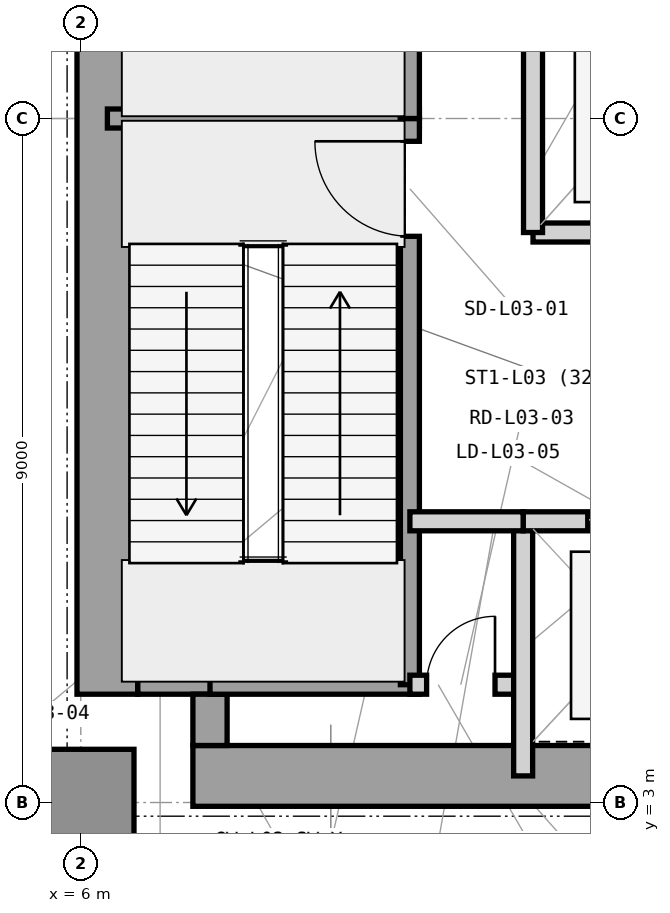
"""IFC4 building model, lengths in metres.
Left out: names, types, materials, properties, quantities, classifications, styles, units other than length and angle.
Written with IfcOpenShell. Run it as: python <this file> out.ifc"""

import sys

from ifc_helpers import new_model, si_unit, direction, frame, frame_2d, origin, origin_2d, place, context, subcontext, project, spatial, rectangle, extrude, element, fill, save


model = new_model("IFC4")
c1 = context("Model", 3, precision=1e-05, world=origin(), true_north=direction((0.0, 1.0)))
c2 = subcontext(c1, "Body", "Model", "MODEL_VIEW")
j1 = project(units=[si_unit("LENGTHUNIT", "METRE"), si_unit("PLANEANGLEUNIT", "RADIAN")], contexts=[c1])
p1 = place(None, origin())
s1 = spatial("IfcSite", under=j1, at=p1, CompositionType="ELEMENT")
p2 = place(p1, origin())
s2 = spatial("IfcBuilding", under=s1, at=p2, CompositionType="ELEMENT")
p3 = place(p2, frame((0.0, 0.0, 16.2)))
s3 = spatial("IfcBuildingStorey", under=s2, at=p3, CompositionType="ELEMENT", Elevation=16.2)
p4 = place(p3, frame((7.475, 3.35, 0.0), z_axis=(0.0, 0.0, 1.0), x_axis=(1.0, 0.0, 0.0)))
e1 = element("IfcWall", 1, at=p4, inside=s3, PredefinedType="SHEAR", context=c2, shape_type="SweptSolid", body=[
    extrude(rectangle(XDim=16.575, YDim=0.8, at=frame_2d((8.288, 0.0))), origin(), (0.0, 0.0, 1.0), 5.4),
])
p5 = place(p3, frame((6.35, 4.425, 0.0), z_axis=(0.0, 0.0, 1.0), x_axis=(0.0, 1.0, 0.0)))
e2 = element("IfcWall", 2, at=p5, inside=s3, PredefinedType="SHEAR", context=c2, shape_type="SweptSolid", body=[
    extrude(rectangle(XDim=15.15, YDim=0.8, at=frame_2d((7.575, 0.0))), origin(), (0.0, 0.0, 1.0), 5.4),
])
p6 = place(p3, frame((6.75, 4.65, 0.0), z_axis=(0.0, 0.0, 1.0), x_axis=(1.0, 0.0, 0.0)))
e3 = element("IfcWall", 3, at=p6, inside=s3, PredefinedType="SHEAR", context=c2, shape_type="SweptSolid", body=[
    extrude(rectangle(XDim=1.175, YDim=0.45, at=frame_2d((0.587, 0.0))), origin(), (0.0, 0.0, 1.0), 5.4),
])
p7 = place(p3, frame((7.7, 3.75, 0.0), z_axis=(0.0, 0.0, 1.0), x_axis=(0.0, 1.0, 0.0)))
e4 = element("IfcWall", 4, at=p7, inside=s3, PredefinedType="SHEAR", context=c2, shape_type="SweptSolid", body=[
    extrude(rectangle(XDim=0.675, YDim=0.45, at=frame_2d((0.337, 0.0))), origin(), (0.0, 0.0, 1.0), 5.4),
])
p8 = place(p3, frame((6.0, 3.0, -0.6), z_axis=(0.0, 0.0, 1.0), x_axis=(1.0, 0.0, 0.0)))
e5 = element("IfcColumn", 5, at=p8, inside=s3, PredefinedType="COLUMN", context=c2, shape_type="SweptSolid", body=[
    extrude(rectangle(XDim=1.4, YDim=1.4, at=origin_2d()), origin(), (0.0, 0.0, 1.0), 6.0),
])
p9 = place(p3, frame((6.35, 12.0, 0.0), z_axis=(0.0, 0.0, 1.0), x_axis=(1.0, 0.0, 0.0)))
e6 = element("IfcWall", 6, at=p9, inside=s3, PredefinedType="SHEAR", context=c2, shape_type="SweptSolid", body=[
    extrude(rectangle(XDim=4.105, YDim=0.25, at=frame_2d((2.052, 0.0))), origin(), (0.0, 0.0, 1.0), 5.4),
])
p10 = place(p3, frame((7.7, 4.55, 0.0), z_axis=(0.0, 0.0, 1.0), x_axis=(1.0, 0.0, 0.0)))
e7 = element("IfcWall", 7, at=p10, inside=s3, PredefinedType="SHEAR", context=c2, shape_type="SweptSolid", body=[
    extrude(rectangle(XDim=2.755, YDim=0.25, at=frame_2d((1.377, 0.0))), origin(), (0.0, 0.0, 1.0), 5.4),
])
p11 = place(p3, frame((10.33, 4.55, 0.0), z_axis=(0.0, 0.0, 1.0), x_axis=(0.0, 1.0, 0.0)))
e8 = element("IfcWall", 8, at=p11, inside=s3, PredefinedType="SHEAR", context=c2, shape_type="SweptSolid", body=[
    extrude(rectangle(XDim=7.45, YDim=0.25, at=frame_2d((3.725, 0.0))), origin(), (0.0, 0.0, 1.0), 5.4),
])
p12 = place(p11, frame((5.9, 0.0, 0.0)))
e9 = element("IfcOpeningElement", 9, at=p12, cuts=e8, PredefinedType="OPENING", context=c2, shape_type="SweptSolid", body=[
    extrude(rectangle(XDim=1.25, YDim=2.2, at=frame_2d((0.625, 1.1))), frame((0.0, 0.135, 0.0), z_axis=(0.0, -1.0, 0.0), x_axis=(1.0, 0.0, 0.0)), (0.0, 0.0, 1.0), 0.27),
])
p13 = place(p3, frame((10.33, 12.0, 0.0), z_axis=(0.0, 0.0, 1.0), x_axis=(0.0, 1.0, 0.0)))
e10 = element("IfcWall", 10, at=p13, inside=s3, PredefinedType="SHEAR", context=c2, shape_type="SweptSolid", body=[
    extrude(rectangle(XDim=7.45, YDim=0.25, at=frame_2d((3.725, 0.0))), origin(), (0.0, 0.0, 1.0), 5.4),
])
p14 = place(p13, frame((5.85, 0.0, 0.0)))
e11 = element("IfcOpeningElement", 11, at=p14, cuts=e10, PredefinedType="OPENING", context=c2, shape_type="SweptSolid", body=[
    extrude(rectangle(XDim=1.25, YDim=2.2, at=frame_2d((0.625, 1.1))), frame((0.0, 0.135, 0.0), z_axis=(0.0, -1.0, 0.0), x_axis=(1.0, 0.0, 0.0)), (0.0, 0.0, 1.0), 0.27),
])
p15 = place(p3, frame((10.33, 4.55, 0.0), z_axis=(0.0, 0.0, 1.0), x_axis=(1.0, 0.0, 0.0)))
e12 = element("IfcWall", 12, at=p15, inside=s3, PredefinedType="PARTITIONING", context=c2, shape_type="SweptSolid", body=[
    extrude(rectangle(XDim=1.49, YDim=0.25, at=frame_2d((0.745, 0.0))), origin(), (0.0, 0.0, 1.0), 5.13),
])
p16 = place(p15, frame((0.22, 0.0, 0.0)))
e13 = element("IfcOpeningElement", 13, at=p16, cuts=e12, PredefinedType="OPENING", context=c2, shape_type="SweptSolid", body=[
    extrude(rectangle(XDim=0.9, YDim=2.1, at=frame_2d((0.45, 1.05))), frame((0.0, 0.135, 0.0), z_axis=(0.0, -1.0, 0.0), x_axis=(1.0, 0.0, 0.0)), (0.0, 0.0, 1.0), 0.27),
])
p17 = place(p3, frame((11.82, 3.35, 0.0), z_axis=(0.0, 0.0, 1.0), x_axis=(0.0, 1.0, 0.0)))
e14 = element("IfcWall", 14, at=p17, inside=s3, PredefinedType="PARTITIONING", context=c2, shape_type="SweptSolid", body=[
    extrude(rectangle(XDim=3.35, YDim=0.25, at=frame_2d((1.675, 0.0))), origin(), (0.0, 0.0, 1.0), 5.13),
])
p18 = place(p3, frame((11.82, 6.7, 0.0), z_axis=(0.0, 0.0, 1.0), x_axis=(1.0, 0.0, 0.0)))
e15 = element("IfcWall", 15, at=p18, inside=s3, PredefinedType="PARTITIONING", context=c2, shape_type="SweptSolid", body=[
    extrude(rectangle(XDim=2.88, YDim=0.25, at=frame_2d((1.44, 0.0))), origin(), (0.0, 0.0, 1.0), 4.626),
])
p19 = place(p18, frame((0.85, 0.0, 0.0)))
e16 = element("IfcOpeningElement", 16, at=p19, cuts=e15, PredefinedType="OPENING", context=c2, shape_type="SweptSolid", body=[
    extrude(rectangle(XDim=1.1, YDim=2.25, at=frame_2d((0.55, 1.125))), frame((0.0, 0.135, 0.0), z_axis=(0.0, -1.0, 0.0), x_axis=(1.0, 0.0, 0.0)), (0.0, 0.0, 1.0), 0.27),
])
p20 = place(p3, frame((11.95, 10.5, 0.0), z_axis=(0.0, 0.0, 1.0), x_axis=(1.0, 0.0, 0.0)))
e17 = element("IfcWall", 17, at=p20, inside=s3, PredefinedType="PARTITIONING", context=c2, shape_type="SweptSolid", body=[
    extrude(rectangle(XDim=2.75, YDim=0.25, at=frame_2d((1.375, 0.0))), origin(), (0.0, 0.0, 1.0), 4.626),
])
p21 = place(p20, frame((0.8, 0.0, 0.0)))
e18 = element("IfcOpeningElement", 18, at=p21, cuts=e17, PredefinedType="OPENING", context=c2, shape_type="SweptSolid", body=[
    extrude(rectangle(XDim=1.1, YDim=2.25, at=frame_2d((0.55, 1.125))), frame((0.0, 0.135, 0.0), z_axis=(0.0, -1.0, 0.0), x_axis=(1.0, 0.0, 0.0)), (0.0, 0.0, 1.0), 0.27),
])
p22 = place(p3, frame((11.95, 10.5, 0.0), z_axis=(0.0, 0.0, 1.0), x_axis=(0.0, 1.0, 0.0)))
e19 = element("IfcWall", 19, at=p22, inside=s3, PredefinedType="PARTITIONING", context=c2, shape_type="SweptSolid", body=[
    extrude(rectangle(XDim=3.0, YDim=0.25, at=frame_2d((1.5, 0.0))), origin(), (0.0, 0.0, 1.0), 5.13),
])
p23 = place(p3, frame((10.33, 6.7, 0.0), z_axis=(0.0, 0.0, 1.0), x_axis=(1.0, 0.0, 0.0)))
e20 = element("IfcWall", 20, at=p23, inside=s3, PredefinedType="PARTITIONING", context=c2, shape_type="SweptSolid", body=[
    extrude(rectangle(XDim=1.49, YDim=0.25, at=frame_2d((0.745, 0.0))), origin(), (0.0, 0.0, 1.0), 4.626),
])
p24 = place(p12, origin())
e21 = element("IfcDoor", 21, at=p24, inside=s3, OperationType="SINGLE_SWING_RIGHT", PredefinedType="DOOR", context=c2, shape_type="SweptSolid", body=[
    extrude(rectangle(XDim=1.25, YDim=2.2, at=frame_2d((0.625, 1.1))), frame((0.0, 0.025, 0.0), z_axis=(0.0, -1.0, 0.0), x_axis=(1.0, 0.0, 0.0)), (0.0, 0.0, 1.0), 0.05),
])
fill(e9, e21)
p25 = place(p16, origin())
e22 = element("IfcDoor", 22, at=p25, inside=s3, OperationType="SINGLE_SWING_RIGHT", PredefinedType="TRAPDOOR", context=c2, shape_type="SweptSolid", body=[
    extrude(rectangle(XDim=0.9, YDim=2.1, at=frame_2d((0.45, 1.05))), frame((0.0, 0.025, 0.0), z_axis=(0.0, -1.0, 0.0), x_axis=(1.0, 0.0, 0.0)), (0.0, 0.0, 1.0), 0.05),
])
fill(e13, e22)
p26 = place(p19, origin())
e23 = element("IfcDoor", 23, at=p26, inside=s3, OperationType="DOUBLE_DOOR_SLIDING", PredefinedType="DOOR", context=c2, shape_type="SweptSolid", body=[
    extrude(rectangle(XDim=1.1, YDim=2.25, at=frame_2d((0.55, 1.125))), frame((0.0, 0.025, 0.0), z_axis=(0.0, -1.0, 0.0), x_axis=(1.0, 0.0, 0.0)), (0.0, 0.0, 1.0), 0.05),
])
fill(e16, e23)
save(model, sys.argv[1])
